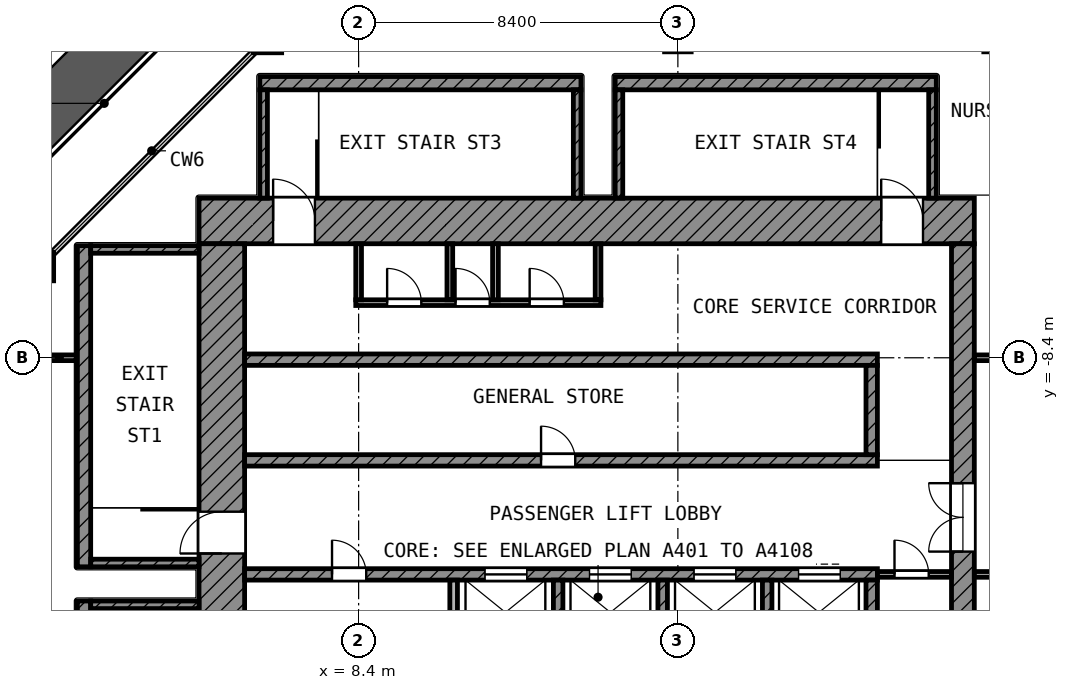
"""IFC4 building model, lengths in metres.
Left out: names, types, materials, properties, quantities, classifications, styles, units other than length and angle.
Written with IfcOpenShell. Run it as: python <this file> out.ifc"""

import sys

from ifc_helpers import new_model, si_unit, direction, frame, frame_2d, origin, origin_2d, place, context, subcontext, project, spatial, rectangle, extrude, element, fill, save


model = new_model("IFC4")
c1 = context("Model", 3, precision=1e-05, world=origin(), true_north=direction((0.0, 1.0)))
c2 = subcontext(c1, "Body", "Model", "MODEL_VIEW")
j1 = project(units=[si_unit("LENGTHUNIT", "METRE"), si_unit("PLANEANGLEUNIT", "RADIAN")], contexts=[c1])
p1 = place(None, origin())
s1 = spatial("IfcSite", under=j1, at=p1, CompositionType="ELEMENT")
p2 = place(p1, origin())
s2 = spatial("IfcBuilding", under=s1, at=p2, CompositionType="ELEMENT")
p3 = place(p2, frame((0.0, 0.0, 332.2)))
s3 = spatial("IfcBuildingStorey", under=s2, at=p3, CompositionType="ELEMENT", Elevation=332.2)
for number, where, z_axis, x_axis in (
    (1, (6.0, 0.0, 0.0), (0.0, 0.0, 1.0), (1.0, 0.0, 0.0)),
    (2, (0.0, -6.0, 0.0), (0.0, 0.0, 1.0), (1.0, 0.0, 0.0)),
):
    element("IfcColumn", number, at=place(p3, frame(where, z_axis=z_axis, x_axis=x_axis)), inside=s3, PredefinedType="COLUMN", context=c2, shape_type="SweptSolid", body=[
        extrude(rectangle(XDim=0.75, YDim=0.75, at=origin_2d()), origin(), (0.0, 0.0, 1.0), 4.5),
    ])
p4 = place(p3, frame((4.2, -4.8, 0.0), z_axis=(0.0, 0.0, 1.0), x_axis=(1.0, 0.0, 0.0)))
e3 = element("IfcWall", 3, at=p4, inside=s3, PredefinedType="SHEAR", context=c2, shape_type="SweptSolid", body=[
    extrude(rectangle(XDim=20.4, YDim=1.2, at=frame_2d((10.2, 0.0))), origin(), (0.0, 0.0, 1.0), 3.95),
])
p5 = place(p4, frame((1.95, 0.0, 0.0)))
e4 = element("IfcOpeningElement", 4, at=p5, cuts=e3, PredefinedType="OPENING", context=c2, shape_type="SweptSolid", body=[
    extrude(rectangle(XDim=1.1, YDim=2.1, at=frame_2d((0.55, 1.05))), frame((0.0, 0.61, 0.0), z_axis=(0.0, -1.0, 0.0), x_axis=(1.0, 0.0, 0.0)), (0.0, 0.0, 1.0), 1.22),
])
p6 = place(p4, frame((17.95, 0.0, 0.0)))
e5 = element("IfcOpeningElement", 5, at=p6, cuts=e3, PredefinedType="OPENING", context=c2, shape_type="SweptSolid", body=[
    extrude(rectangle(XDim=1.1, YDim=2.1, at=frame_2d((0.55, 1.05))), frame((0.0, 0.61, 0.0), z_axis=(0.0, -1.0, 0.0), x_axis=(1.0, 0.0, 0.0)), (0.0, 0.0, 1.0), 1.22),
])
p7 = place(p3, frame((4.8, -24.6, 0.0), z_axis=(0.0, 0.0, 1.0), x_axis=(0.0, 1.0, 0.0)))
e6 = element("IfcWall", 6, at=p7, inside=s3, PredefinedType="SHEAR", context=c2, shape_type="SweptSolid", body=[
    extrude(rectangle(XDim=19.2, YDim=1.2, at=frame_2d((9.6, 0.0))), origin(), (0.0, 0.0, 1.0), 3.95),
])
p8 = place(p7, frame((11.05, 0.0, 0.0)))
e7 = element("IfcOpeningElement", 7, at=p8, cuts=e6, PredefinedType="OPENING", context=c2, shape_type="SweptSolid", body=[
    extrude(rectangle(XDim=1.1, YDim=2.1, at=frame_2d((0.55, 1.05))), frame((0.0, 0.61, 0.0), z_axis=(0.0, -1.0, 0.0), x_axis=(1.0, 0.0, 0.0)), (0.0, 0.0, 1.0), 1.22),
])
p9 = place(p7, frame((1.75, 0.0, 0.0)))
e8 = element("IfcOpeningElement", 8, at=p9, cuts=e6, PredefinedType="OPENING", context=c2, shape_type="SweptSolid", body=[
    extrude(rectangle(XDim=1.1, YDim=2.1, at=frame_2d((0.55, 1.05))), frame((0.0, 0.61, 0.0), z_axis=(0.0, -1.0, 0.0), x_axis=(1.0, 0.0, 0.0)), (0.0, 0.0, 1.0), 1.22),
])
p10 = place(p3, frame((24.3, -24.0, 0.0), z_axis=(0.0, 0.0, 1.0), x_axis=(0.0, 1.0, 0.0)))
e9 = element("IfcWall", 9, at=p10, inside=s3, PredefinedType="SHEAR", context=c2, shape_type="SweptSolid", body=[
    extrude(rectangle(XDim=18.6, YDim=0.6, at=frame_2d((9.3, 0.0))), origin(), (0.0, 0.0, 1.0), 3.95),
])
p11 = place(p10, frame((10.5, 0.0, 0.0)))
e10 = element("IfcOpeningElement", 10, at=p11, cuts=e9, PredefinedType="OPENING", context=c2, shape_type="SweptSolid", body=[
    extrude(rectangle(XDim=1.8, YDim=2.1, at=frame_2d((0.9, 1.05))), frame((0.0, 0.31, 0.0), z_axis=(0.0, -1.0, 0.0), x_axis=(1.0, 0.0, 0.0)), (0.0, 0.0, 1.0), 0.62),
])
p12 = place(p3, frame((5.4, -8.45, 0.0), z_axis=(0.0, 0.0, 1.0), x_axis=(1.0, 0.0, 0.0)))
e11 = element("IfcWall", 11, at=p12, inside=s3, PredefinedType="SHEAR", context=c2, shape_type="SweptSolid", body=[
    extrude(rectangle(XDim=16.65, YDim=0.3, at=frame_2d((8.325, 0.0))), origin(), (0.0, 0.0, 1.0), 3.95),
])
p13 = place(p3, frame((5.4, -11.1, 0.0), z_axis=(0.0, 0.0, 1.0), x_axis=(1.0, 0.0, 0.0)))
e12 = element("IfcWall", 12, at=p13, inside=s3, PredefinedType="SHEAR", context=c2, shape_type="SweptSolid", body=[
    extrude(rectangle(XDim=16.65, YDim=0.3, at=frame_2d((8.325, 0.0))), origin(), (0.0, 0.0, 1.0), 3.95),
])
p14 = place(p13, frame((7.8, 0.0, 0.0)))
e13 = element("IfcOpeningElement", 13, at=p14, cuts=e12, PredefinedType="OPENING", context=c2, shape_type="SweptSolid", body=[
    extrude(rectangle(XDim=0.9, YDim=2.1, at=frame_2d((0.45, 1.05))), frame((0.0, 0.16, 0.0), z_axis=(0.0, -1.0, 0.0), x_axis=(1.0, 0.0, 0.0)), (0.0, 0.0, 1.0), 0.32),
])
p15 = place(p3, frame((5.4, -14.1, 0.0), z_axis=(0.0, 0.0, 1.0), x_axis=(1.0, 0.0, 0.0)))
e14 = element("IfcWall", 14, at=p15, inside=s3, PredefinedType="SHEAR", context=c2, shape_type="SweptSolid", body=[
    extrude(rectangle(XDim=16.65, YDim=0.3, at=frame_2d((8.325, 0.0))), origin(), (0.0, 0.0, 1.0), 3.95),
])
p16 = place(p15, frame((6.325, 0.0, 0.0)))
e15 = element("IfcOpeningElement", 15, at=p16, cuts=e14, PredefinedType="OPENING", context=c2, shape_type="SweptSolid", body=[
    extrude(rectangle(XDim=1.1, YDim=2.1, at=frame_2d((0.55, 1.05))), frame((0.0, 0.16, 0.0), z_axis=(0.0, -1.0, 0.0), x_axis=(1.0, 0.0, 0.0)), (0.0, 0.0, 1.0), 0.32),
])
p17 = place(p15, frame((9.075, 0.0, 0.0)))
e16 = element("IfcOpeningElement", 16, at=p17, cuts=e14, PredefinedType="OPENING", context=c2, shape_type="SweptSolid", body=[
    extrude(rectangle(XDim=1.1, YDim=2.1, at=frame_2d((0.55, 1.05))), frame((0.0, 0.16, 0.0), z_axis=(0.0, -1.0, 0.0), x_axis=(1.0, 0.0, 0.0)), (0.0, 0.0, 1.0), 0.32),
])
p18 = place(p15, frame((11.825, 0.0, 0.0)))
e17 = element("IfcOpeningElement", 17, at=p18, cuts=e14, PredefinedType="OPENING", context=c2, shape_type="SweptSolid", body=[
    extrude(rectangle(XDim=1.1, YDim=2.1, at=frame_2d((0.55, 1.05))), frame((0.0, 0.16, 0.0), z_axis=(0.0, -1.0, 0.0), x_axis=(1.0, 0.0, 0.0)), (0.0, 0.0, 1.0), 0.32),
])
p19 = place(p15, frame((14.575, 0.0, 0.0)))
e18 = element("IfcOpeningElement", 18, at=p19, cuts=e14, PredefinedType="OPENING", context=c2, shape_type="SweptSolid", body=[
    extrude(rectangle(XDim=1.1, YDim=2.1, at=frame_2d((0.55, 1.05))), frame((0.0, 0.16, 0.0), z_axis=(0.0, -1.0, 0.0), x_axis=(1.0, 0.0, 0.0)), (0.0, 0.0, 1.0), 0.32),
])
p20 = place(p15, frame((2.3, 0.0, 0.0)))
e19 = element("IfcOpeningElement", 19, at=p20, cuts=e14, PredefinedType="OPENING", context=c2, shape_type="SweptSolid", body=[
    extrude(rectangle(XDim=0.9, YDim=2.1, at=frame_2d((0.45, 1.05))), frame((0.0, 0.16, 0.0), z_axis=(0.0, -1.0, 0.0), x_axis=(1.0, 0.0, 0.0)), (0.0, 0.0, 1.0), 0.32),
])
p21 = place(p3, frame((21.9, -10.95, 0.0), z_axis=(0.0, 0.0, 1.0), x_axis=(0.0, 1.0, 0.0)))
e20 = element("IfcWall", 20, at=p21, inside=s3, PredefinedType="SHEAR", context=c2, shape_type="SweptSolid", body=[
    extrude(rectangle(XDim=2.35, YDim=0.3, at=frame_2d((1.175, 0.0))), origin(), (0.0, 0.0, 1.0), 3.95),
])
p22 = place(p3, frame((21.9, -16.6, 0.0), z_axis=(0.0, 0.0, 1.0), x_axis=(0.0, 1.0, 0.0)))
e21 = element("IfcWall", 21, at=p22, inside=s3, PredefinedType="SHEAR", context=c2, shape_type="SweptSolid", body=[
    extrude(rectangle(XDim=2.35, YDim=0.3, at=frame_2d((1.175, 0.0))), origin(), (0.0, 0.0, 1.0), 3.95),
])
p23 = place(p3, frame((10.9, -16.6, 0.0), z_axis=(0.0, 0.0, 1.0), x_axis=(0.0, 1.0, 0.0)))
e22 = element("IfcWall", 22, at=p23, inside=s3, PredefinedType="PARTITIONING", context=c2, shape_type="SweptSolid", body=[
    extrude(rectangle(XDim=2.35, YDim=0.2, at=frame_2d((1.175, 0.0))), origin(), (0.0, 0.0, 1.0), 3.95),
])
for number, where, z_axis, x_axis in (
    (23, (13.65, -16.6, 0.0), (0.0, 0.0, 1.0), (0.0, 1.0, 0.0)),
    (24, (16.4, -16.6, 0.0), (0.0, 0.0, 1.0), (0.0, 1.0, 0.0)),
    (25, (19.15, -16.6, 0.0), (0.0, 0.0, 1.0), (0.0, 1.0, 0.0)),
):
    element("IfcWall", number, at=place(p3, frame(where, z_axis=z_axis, x_axis=x_axis)), inside=s3, PredefinedType="SHEAR", context=c2, shape_type="SweptSolid", body=[
        extrude(rectangle(XDim=2.35, YDim=0.25, at=frame_2d((1.175, 0.0))), origin(), (0.0, 0.0, 1.0), 3.95),
    ])
p24 = place(p3, frame((22.05, -14.1, 0.0), z_axis=(0.0, 0.0, 1.0), x_axis=(1.0, 0.0, 0.0)))
e26 = element("IfcWall", 26, at=p24, inside=s3, PredefinedType="PARTITIONING", context=c2, shape_type="SweptSolid", body=[
    extrude(rectangle(XDim=1.95, YDim=0.15, at=frame_2d((0.975, 0.0))), origin(), (0.0, 0.0, 1.0), 3.95),
])
p25 = place(p24, frame((0.45, 0.0, 0.0)))
e27 = element("IfcOpeningElement", 27, at=p25, cuts=e26, PredefinedType="OPENING", context=c2, shape_type="SweptSolid", body=[
    extrude(rectangle(XDim=0.9, YDim=2.1, at=frame_2d((0.45, 1.05))), frame((0.0, 0.085, 0.0), z_axis=(0.0, -1.0, 0.0), x_axis=(1.0, 0.0, 0.0)), (0.0, 0.0, 1.0), 0.17),
])
p26 = place(p3, frame((8.325, -6.95, 0.0), z_axis=(0.0, 0.0, 1.0), x_axis=(1.0, 0.0, 0.0)))
e28 = element("IfcWall", 28, at=p26, inside=s3, PredefinedType="PARTITIONING", context=c2, shape_type="SweptSolid", body=[
    extrude(rectangle(XDim=6.45, YDim=0.15, at=frame_2d((3.225, 0.0))), origin(), (0.0, 0.0, 1.0), 3.95),
])
p27 = place(p26, frame((0.825, 0.0, 0.0)))
e29 = element("IfcOpeningElement", 29, at=p27, cuts=e28, PredefinedType="OPENING", context=c2, shape_type="SweptSolid", body=[
    extrude(rectangle(XDim=0.9, YDim=2.1, at=frame_2d((0.45, 1.05))), frame((0.0, 0.085, 0.0), z_axis=(0.0, -1.0, 0.0), x_axis=(1.0, 0.0, 0.0)), (0.0, 0.0, 1.0), 0.17),
])
p28 = place(p26, frame((2.625, 0.0, 0.0)))
e30 = element("IfcOpeningElement", 30, at=p28, cuts=e28, PredefinedType="OPENING", context=c2, shape_type="SweptSolid", body=[
    extrude(rectangle(XDim=0.9, YDim=2.1, at=frame_2d((0.45, 1.05))), frame((0.0, 0.085, 0.0), z_axis=(0.0, -1.0, 0.0), x_axis=(1.0, 0.0, 0.0)), (0.0, 0.0, 1.0), 0.17),
])
p29 = place(p26, frame((4.575, 0.0, 0.0)))
e31 = element("IfcOpeningElement", 31, at=p29, cuts=e28, PredefinedType="OPENING", context=c2, shape_type="SweptSolid", body=[
    extrude(rectangle(XDim=0.9, YDim=2.1, at=frame_2d((0.45, 1.05))), frame((0.0, 0.085, 0.0), z_axis=(0.0, -1.0, 0.0), x_axis=(1.0, 0.0, 0.0)), (0.0, 0.0, 1.0), 0.17),
])
for number, where, z_axis, x_axis in (
    (32, (8.4, -6.875, 0.0), (0.0, 0.0, 1.0), (0.0, 1.0, 0.0)),
    (33, (10.8, -6.875, 0.0), (0.0, 0.0, 1.0), (0.0, 1.0, 0.0)),
    (34, (12.0, -6.875, 0.0), (0.0, 0.0, 1.0), (0.0, 1.0, 0.0)),
    (35, (14.7, -6.875, 0.0), (0.0, 0.0, 1.0), (0.0, 1.0, 0.0)),
):
    element("IfcWall", number, at=place(p3, frame(where, z_axis=z_axis, x_axis=x_axis)), inside=s3, PredefinedType="PARTITIONING", context=c2, shape_type="SweptSolid", body=[
        extrude(rectangle(XDim=1.475, YDim=0.15, at=frame_2d((0.738, 0.0))), origin(), (0.0, 0.0, 1.0), 3.95),
    ])
p30 = place(p3, frame((1.175, -13.9, 0.0), z_axis=(0.0, 0.0, 1.0), x_axis=(0.0, 1.0, 0.0)))
e36 = element("IfcWall", 36, at=p30, inside=s3, PredefinedType="SHEAR", context=c2, shape_type="SweptSolid", body=[
    extrude(rectangle(XDim=8.45, YDim=0.35, at=frame_2d((4.225, 0.0))), origin(), (0.0, 0.0, 1.0), 3.95),
])
for number, where, z_axis, x_axis in (
    (37, (1.35, -5.55, 0.0), (0.0, 0.0, 1.0), (1.0, 0.0, 0.0)),
    (38, (1.35, -13.8, 0.0), (0.0, 0.0, 1.0), (1.0, 0.0, 0.0)),
):
    element("IfcWall", number, at=place(p3, frame(where, z_axis=z_axis, x_axis=x_axis)), inside=s3, PredefinedType="SHEAR", context=c2, shape_type="SweptSolid", body=[
        extrude(rectangle(XDim=2.85, YDim=0.2, at=frame_2d((1.425, 0.0))), origin(), (0.0, 0.0, 1.0), 3.95),
    ])
p31 = place(p3, frame((1.175, -23.25, 0.0), z_axis=(0.0, 0.0, 1.0), x_axis=(0.0, 1.0, 0.0)))
e39 = element("IfcWall", 39, at=p31, inside=s3, PredefinedType="SHEAR", context=c2, shape_type="SweptSolid", body=[
    extrude(rectangle(XDim=8.45, YDim=0.35, at=frame_2d((4.225, 0.0))), origin(), (0.0, 0.0, 1.0), 3.95),
])
p32 = place(p3, frame((1.35, -14.9, 0.0), z_axis=(0.0, 0.0, 1.0), x_axis=(1.0, 0.0, 0.0)))
e40 = element("IfcWall", 40, at=p32, inside=s3, PredefinedType="SHEAR", context=c2, shape_type="SweptSolid", body=[
    extrude(rectangle(XDim=2.85, YDim=0.2, at=frame_2d((1.425, 0.0))), origin(), (0.0, 0.0, 1.0), 3.95),
])
p33 = place(p3, frame((5.8, -1.175, 0.0), z_axis=(0.0, 0.0, 1.0), x_axis=(1.0, 0.0, 0.0)))
e41 = element("IfcWall", 41, at=p33, inside=s3, PredefinedType="SHEAR", context=c2, shape_type="SweptSolid", body=[
    extrude(rectangle(XDim=8.45, YDim=0.35, at=frame_2d((4.225, 0.0))), origin(), (0.0, 0.0, 1.0), 3.95),
])
for number, where, z_axis, x_axis in (
    (42, (5.9, -4.2, 0.0), (0.0, 0.0, 1.0), (0.0, 1.0, 0.0)),
    (43, (14.15, -4.2, 0.0), (0.0, 0.0, 1.0), (0.0, 1.0, 0.0)),
):
    element("IfcWall", number, at=place(p3, frame(where, z_axis=z_axis, x_axis=x_axis)), inside=s3, PredefinedType="SHEAR", context=c2, shape_type="SweptSolid", body=[
        extrude(rectangle(XDim=2.85, YDim=0.2, at=frame_2d((1.425, 0.0))), origin(), (0.0, 0.0, 1.0), 3.95),
    ])
p34 = place(p3, frame((15.15, -1.175, 0.0), z_axis=(0.0, 0.0, 1.0), x_axis=(1.0, 0.0, 0.0)))
e44 = element("IfcWall", 44, at=p34, inside=s3, PredefinedType="SHEAR", context=c2, shape_type="SweptSolid", body=[
    extrude(rectangle(XDim=8.45, YDim=0.35, at=frame_2d((4.225, 0.0))), origin(), (0.0, 0.0, 1.0), 3.95),
])
for number, where, z_axis, x_axis in (
    (45, (15.25, -4.2, 0.0), (0.0, 0.0, 1.0), (0.0, 1.0, 0.0)),
    (46, (23.5, -4.2, 0.0), (0.0, 0.0, 1.0), (0.0, 1.0, 0.0)),
):
    element("IfcWall", number, at=place(p3, frame(where, z_axis=z_axis, x_axis=x_axis)), inside=s3, PredefinedType="SHEAR", context=c2, shape_type="SweptSolid", body=[
        extrude(rectangle(XDim=2.85, YDim=0.2, at=frame_2d((1.425, 0.0))), origin(), (0.0, 0.0, 1.0), 3.95),
    ])
p35 = place(p3, frame((24.6, -14.1, 0.0), z_axis=(0.0, 0.0, 1.0), x_axis=(1.0, 0.0, 0.0)))
e47 = element("IfcWall", 47, at=p35, inside=s3, PredefinedType="PARTITIONING", context=c2, shape_type="SweptSolid", body=[
    extrude(rectangle(XDim=4.725, YDim=0.15, at=frame_2d((2.362, 0.0))), origin(), (0.0, 0.0, 1.0), 3.95),
])
p36 = place(p35, frame((2.2, 0.0, 0.0)))
e48 = element("IfcOpeningElement", 48, at=p36, cuts=e47, PredefinedType="OPENING", context=c2, shape_type="SweptSolid", body=[
    extrude(rectangle(XDim=1.0, YDim=2.1, at=frame_2d((0.5, 1.05))), frame((0.0, 0.085, 0.0), z_axis=(0.0, -1.0, 0.0), x_axis=(1.0, 0.0, 0.0)), (0.0, 0.0, 1.0), 0.17),
])
p37 = place(p3, frame((0.08, -8.4, 0.0), z_axis=(0.0, 0.0, 1.0), x_axis=(1.0, 0.0, 0.0)))
e49 = element("IfcWall", 49, at=p37, inside=s3, PredefinedType="PARTITIONING", context=c2, shape_type="SweptSolid", body=[
    extrude(rectangle(XDim=0.89, YDim=0.15, at=frame_2d((0.445, 0.0))), origin(), (0.0, 0.0, 1.0), 3.95),
])
p38 = place(p3, frame((24.6, -8.4, 0.0), z_axis=(0.0, 0.0, 1.0), x_axis=(1.0, 0.0, 0.0)))
e50 = element("IfcWall", 50, at=p38, inside=s3, PredefinedType="PARTITIONING", context=c2, shape_type="SweptSolid", body=[
    extrude(rectangle(XDim=15.732, YDim=0.15, at=frame_2d((7.866, 0.0))), origin(), (0.0, 0.0, 1.0), 3.95),
])
p39 = place(p38, frame((3.3, 0.0, 0.0)))
e51 = element("IfcOpeningElement", 51, at=p39, cuts=e50, PredefinedType="OPENING", context=c2, shape_type="SweptSolid", body=[
    extrude(rectangle(XDim=1.2, YDim=2.1, at=frame_2d((0.6, 1.05))), frame((0.0, 0.085, 0.0), z_axis=(0.0, -1.0, 0.0), x_axis=(1.0, 0.0, 0.0)), (0.0, 0.0, 1.0), 0.17),
])
p40 = place(p38, frame((9.419, 0.0, 0.0)))
e52 = element("IfcOpeningElement", 52, at=p40, cuts=e50, PredefinedType="OPENING", context=c2, shape_type="SweptSolid", body=[
    extrude(rectangle(XDim=1.5, YDim=2.1, at=frame_2d((0.75, 1.05))), frame((0.0, 0.085, 0.0), z_axis=(0.0, -1.0, 0.0), x_axis=(1.0, 0.0, 0.0)), (0.0, 0.0, 1.0), 0.17),
])
p41 = place(p38, frame((12.188, 0.0, 0.0)))
e53 = element("IfcOpeningElement", 53, at=p41, cuts=e50, PredefinedType="OPENING", context=c2, shape_type="SweptSolid", body=[
    extrude(rectangle(XDim=1.5, YDim=2.1, at=frame_2d((0.75, 1.05))), frame((0.0, 0.085, 0.0), z_axis=(0.0, -1.0, 0.0), x_axis=(1.0, 0.0, 0.0)), (0.0, 0.0, 1.0), 0.17),
])
p42 = place(p16, origin())
e54 = element("IfcDoor", 54, at=p42, inside=s3, OperationType="DOUBLE_DOOR_SLIDING", PredefinedType="DOOR", context=c2, shape_type="SweptSolid", body=[
    extrude(rectangle(XDim=1.1, YDim=2.1, at=frame_2d((0.55, 1.05))), frame((0.0, 0.025, 0.0), z_axis=(0.0, -1.0, 0.0), x_axis=(1.0, 0.0, 0.0)), (0.0, 0.0, 1.0), 0.05),
])
fill(e15, e54)
p43 = place(p17, origin())
e55 = element("IfcDoor", 55, at=p43, inside=s3, OperationType="DOUBLE_DOOR_SLIDING", PredefinedType="DOOR", context=c2, shape_type="SweptSolid", body=[
    extrude(rectangle(XDim=1.1, YDim=2.1, at=frame_2d((0.55, 1.05))), frame((0.0, 0.025, 0.0), z_axis=(0.0, -1.0, 0.0), x_axis=(1.0, 0.0, 0.0)), (0.0, 0.0, 1.0), 0.05),
])
fill(e16, e55)
p44 = place(p18, origin())
e56 = element("IfcDoor", 56, at=p44, inside=s3, OperationType="DOUBLE_DOOR_SLIDING", PredefinedType="DOOR", context=c2, shape_type="SweptSolid", body=[
    extrude(rectangle(XDim=1.1, YDim=2.1, at=frame_2d((0.55, 1.05))), frame((0.0, 0.025, 0.0), z_axis=(0.0, -1.0, 0.0), x_axis=(1.0, 0.0, 0.0)), (0.0, 0.0, 1.0), 0.05),
])
fill(e17, e56)
p45 = place(p19, origin())
e57 = element("IfcDoor", 57, at=p45, inside=s3, OperationType="DOUBLE_DOOR_SLIDING", PredefinedType="DOOR", context=c2, shape_type="SweptSolid", body=[
    extrude(rectangle(XDim=1.1, YDim=2.1, at=frame_2d((0.55, 1.05))), frame((0.0, 0.025, 0.0), z_axis=(0.0, -1.0, 0.0), x_axis=(1.0, 0.0, 0.0)), (0.0, 0.0, 1.0), 0.05),
])
fill(e18, e57)
p46 = place(p8, origin())
e58 = element("IfcDoor", 58, at=p46, inside=s3, OperationType="SINGLE_SWING_LEFT", PredefinedType="DOOR", context=c2, shape_type="SweptSolid", body=[
    extrude(rectangle(XDim=1.1, YDim=2.1, at=frame_2d((0.55, 1.05))), frame((0.0, 0.025, 0.0), z_axis=(0.0, -1.0, 0.0), x_axis=(1.0, 0.0, 0.0)), (0.0, 0.0, 1.0), 0.05),
])
fill(e7, e58)
p47 = place(p5, origin())
e59 = element("IfcDoor", 59, at=p47, inside=s3, OperationType="SINGLE_SWING_LEFT", PredefinedType="DOOR", context=c2, shape_type="SweptSolid", body=[
    extrude(rectangle(XDim=1.1, YDim=2.1, at=frame_2d((0.55, 1.05))), frame((0.0, 0.025, 0.0), z_axis=(0.0, -1.0, 0.0), x_axis=(1.0, 0.0, 0.0)), (0.0, 0.0, 1.0), 0.05),
])
fill(e4, e59)
p48 = place(p6, origin())
e60 = element("IfcDoor", 60, at=p48, inside=s3, OperationType="SINGLE_SWING_LEFT", PredefinedType="DOOR", context=c2, shape_type="SweptSolid", body=[
    extrude(rectangle(XDim=1.1, YDim=2.1, at=frame_2d((0.55, 1.05))), frame((0.0, 0.025, 0.0), z_axis=(0.0, -1.0, 0.0), x_axis=(1.0, 0.0, 0.0)), (0.0, 0.0, 1.0), 0.05),
])
fill(e5, e60)
p49 = place(p11, origin())
e61 = element("IfcDoor", 61, at=p49, inside=s3, OperationType="DOUBLE_DOOR_SINGLE_SWING", PredefinedType="DOOR", context=c2, shape_type="SweptSolid", body=[
    extrude(rectangle(XDim=1.8, YDim=2.1, at=frame_2d((0.9, 1.05))), frame((0.0, 0.025, 0.0), z_axis=(0.0, -1.0, 0.0), x_axis=(1.0, 0.0, 0.0)), (0.0, 0.0, 1.0), 0.05),
])
fill(e10, e61)
p50 = place(p27, origin())
e62 = element("IfcDoor", 62, at=p50, inside=s3, OperationType="SINGLE_SWING_LEFT", PredefinedType="DOOR", context=c2, shape_type="SweptSolid", body=[
    extrude(rectangle(XDim=0.9, YDim=2.1, at=frame_2d((0.45, 1.05))), frame((0.0, 0.025, 0.0), z_axis=(0.0, -1.0, 0.0), x_axis=(1.0, 0.0, 0.0)), (0.0, 0.0, 1.0), 0.05),
])
fill(e29, e62)
p51 = place(p28, origin())
e63 = element("IfcDoor", 63, at=p51, inside=s3, OperationType="SINGLE_SWING_LEFT", PredefinedType="DOOR", context=c2, shape_type="SweptSolid", body=[
    extrude(rectangle(XDim=0.9, YDim=2.1, at=frame_2d((0.45, 1.05))), frame((0.0, 0.025, 0.0), z_axis=(0.0, -1.0, 0.0), x_axis=(1.0, 0.0, 0.0)), (0.0, 0.0, 1.0), 0.05),
])
fill(e30, e63)
p52 = place(p29, origin())
e64 = element("IfcDoor", 64, at=p52, inside=s3, OperationType="SINGLE_SWING_LEFT", PredefinedType="DOOR", context=c2, shape_type="SweptSolid", body=[
    extrude(rectangle(XDim=0.9, YDim=2.1, at=frame_2d((0.45, 1.05))), frame((0.0, 0.025, 0.0), z_axis=(0.0, -1.0, 0.0), x_axis=(1.0, 0.0, 0.0)), (0.0, 0.0, 1.0), 0.05),
])
fill(e31, e64)
p53 = place(p25, origin())
e65 = element("IfcDoor", 65, at=p53, inside=s3, OperationType="SINGLE_SWING_LEFT", PredefinedType="DOOR", context=c2, shape_type="SweptSolid", body=[
    extrude(rectangle(XDim=0.9, YDim=2.1, at=frame_2d((0.45, 1.05))), frame((0.0, 0.025, 0.0), z_axis=(0.0, -1.0, 0.0), x_axis=(1.0, 0.0, 0.0)), (0.0, 0.0, 1.0), 0.05),
])
fill(e27, e65)
p54 = place(p14, origin())
e66 = element("IfcDoor", 66, at=p54, inside=s3, OperationType="SINGLE_SWING_LEFT", PredefinedType="DOOR", context=c2, shape_type="SweptSolid", body=[
    extrude(rectangle(XDim=0.9, YDim=2.1, at=frame_2d((0.45, 1.05))), frame((0.0, 0.025, 0.0), z_axis=(0.0, -1.0, 0.0), x_axis=(1.0, 0.0, 0.0)), (0.0, 0.0, 1.0), 0.05),
])
fill(e13, e66)
p55 = place(p20, origin())
e67 = element("IfcDoor", 67, at=p55, inside=s3, OperationType="SINGLE_SWING_LEFT", PredefinedType="DOOR", context=c2, shape_type="SweptSolid", body=[
    extrude(rectangle(XDim=0.9, YDim=2.1, at=frame_2d((0.45, 1.05))), frame((0.0, 0.025, 0.0), z_axis=(0.0, -1.0, 0.0), x_axis=(1.0, 0.0, 0.0)), (0.0, 0.0, 1.0), 0.05),
])
fill(e19, e67)
save(model, sys.argv[1])
